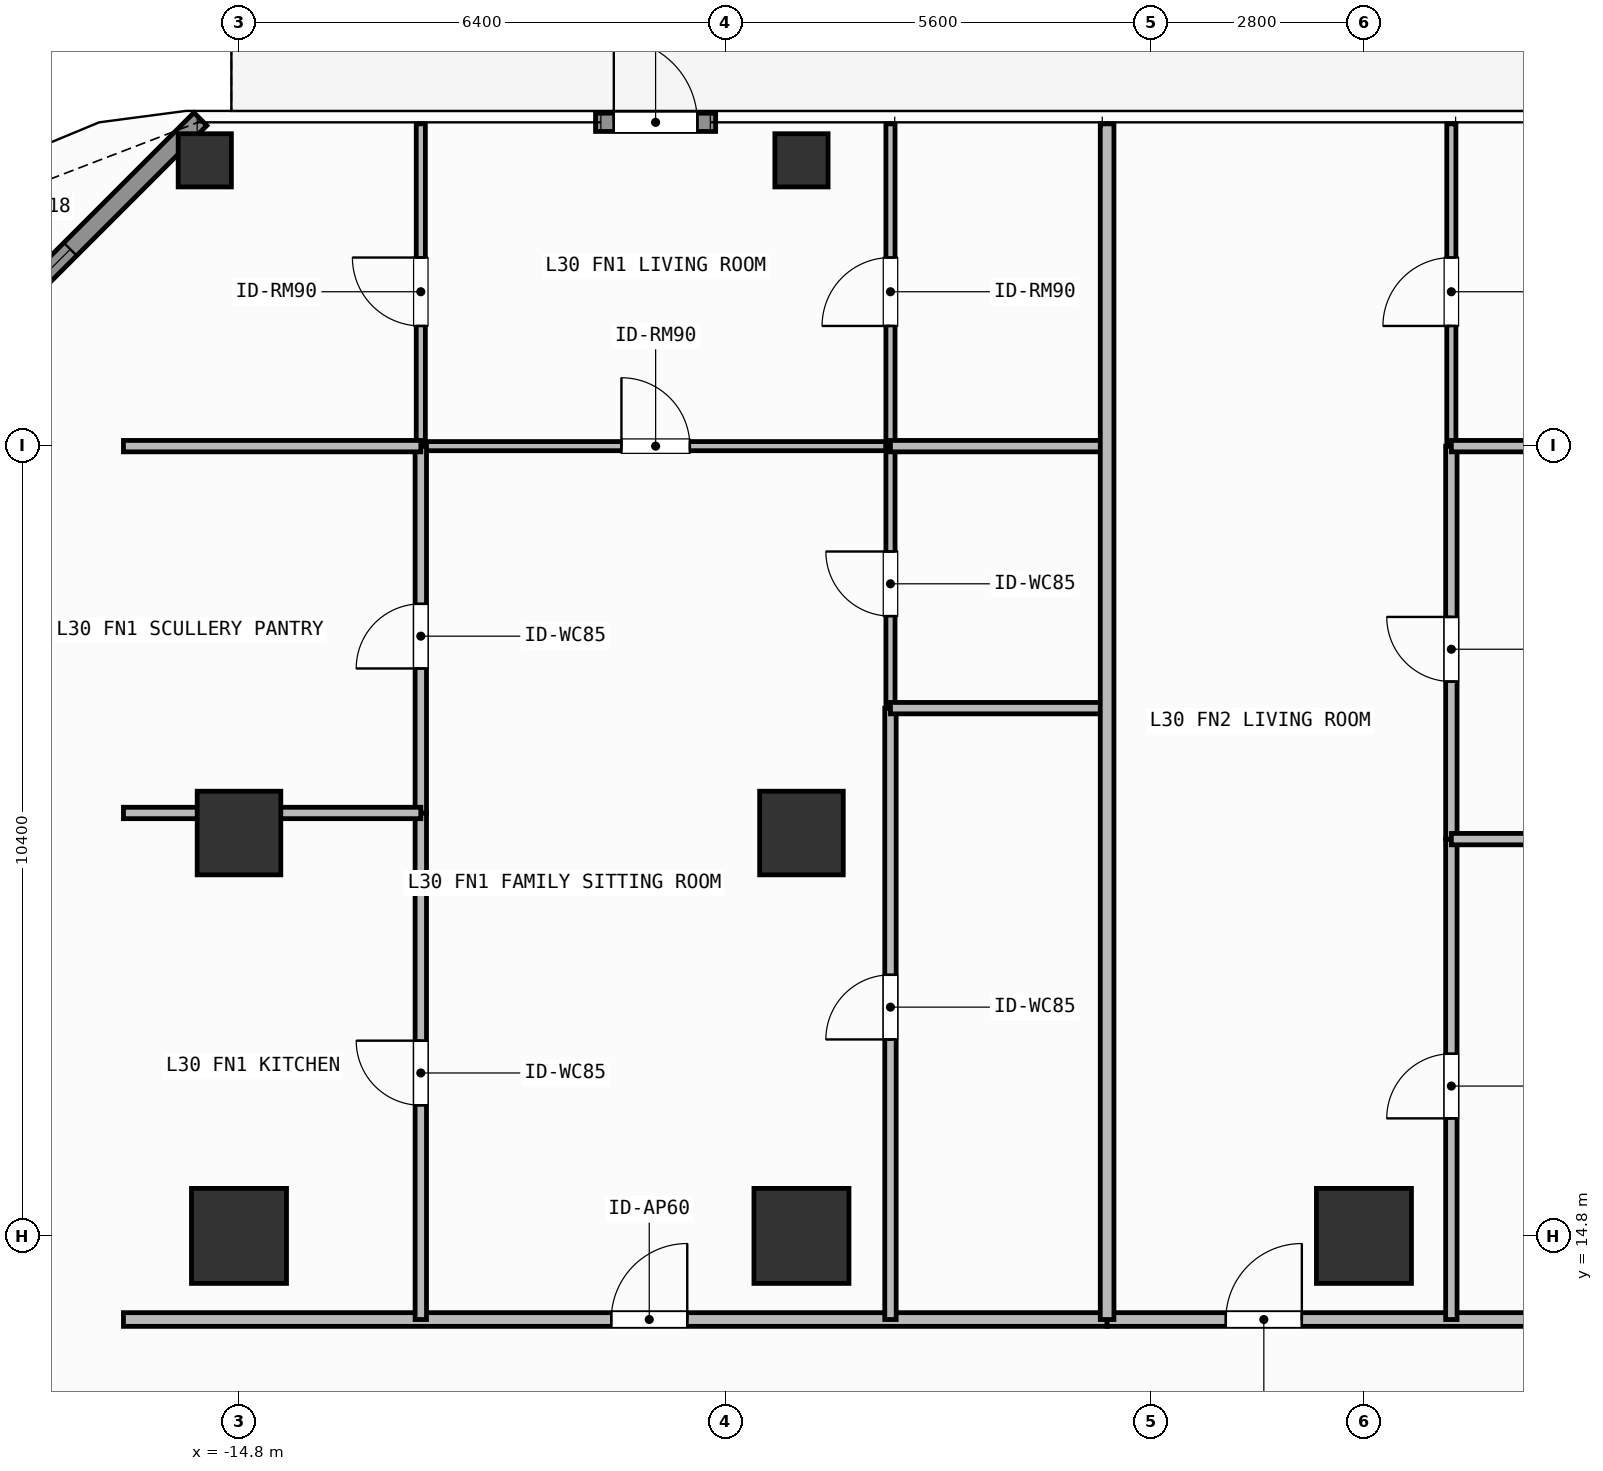
"""IFC4 building model, lengths in metres.
Left out: names, types, materials, properties, quantities, classifications, styles, units other than length and angle.
Written with IfcOpenShell. Run it as: python <this file> out.ifc"""

import sys

from ifc_helpers import new_model, si_unit, direction, frame, frame_2d, origin, origin_2d, place, context, subcontext, project, spatial, rectangle, hollow_rectangle, extrude, element, fill, save


model = new_model("IFC4")
c1 = context("Model", 3, precision=1e-05, world=origin(), true_north=direction((0.0, 1.0)))
c2 = subcontext(c1, "Body", "Model", "MODEL_VIEW")
j1 = project(units=[si_unit("LENGTHUNIT", "METRE"), si_unit("PLANEANGLEUNIT", "RADIAN")], contexts=[c1])
p1 = place(None, origin())
s1 = spatial("IfcSite", under=j1, at=p1, CompositionType="ELEMENT")
p2 = place(p1, origin())
s2 = spatial("IfcBuilding", under=s1, at=p2, CompositionType="ELEMENT")
p3 = place(p2, frame((0.0, 0.0, 121.2)))
s3 = spatial("IfcBuildingStorey", under=s2, at=p3, CompositionType="ELEMENT", Elevation=121.2)
for number, where, z_axis, x_axis in (
    (1, (-14.8, 14.8, 0.0), (0.0, 0.0, 1.0), (1.0, 0.0, 0.0)),
    (2, (-7.4, 14.8, 0.0), (0.0, 0.0, 1.0), (1.0, 0.0, 0.0)),
    (3, (0.0, 14.8, 0.0), (0.0, 0.0, 1.0), (1.0, 0.0, 0.0)),
):
    element("IfcColumn", number, at=place(p3, frame(where, z_axis=z_axis, x_axis=x_axis)), inside=s3, PredefinedType="COLUMN", context=c2, shape_type="SweptSolid", body=[
        extrude(rectangle(XDim=1.25, YDim=1.25, at=origin_2d()), origin(), (0.0, 0.0, 1.0), 3.9),
    ])
for number, where, z_axis, x_axis in (
    (4, (-14.8, 20.1, 0.0), (0.0, 0.0, 1.0), (1.0, 0.0, 0.0)),
    (5, (-7.4, 20.1, 0.0), (0.0, 0.0, 1.0), (1.0, 0.0, 0.0)),
):
    element("IfcColumn", number, at=place(p3, frame(where, z_axis=z_axis, x_axis=x_axis)), inside=s3, PredefinedType="COLUMN", context=c2, shape_type="SweptSolid", body=[
        extrude(rectangle(XDim=1.1, YDim=1.1, at=origin_2d()), origin(), (0.0, 0.0, 1.0), 3.9),
    ])
for number, where, z_axis, x_axis in (
    (6, (-15.25, 28.95, 0.0), (0.0, 0.0, 1.0), (1.0, 0.0, 0.0)),
    (7, (-7.4, 28.95, 0.0), (0.0, 0.0, 1.0), (1.0, 0.0, 0.0)),
):
    element("IfcColumn", number, at=place(p3, frame(where, z_axis=z_axis, x_axis=x_axis)), inside=s3, PredefinedType="COLUMN", context=c2, shape_type="SweptSolid", body=[
        extrude(hollow_rectangle(XDim=0.7, YDim=0.7, WallThickness=0.032, at=origin_2d()), origin(), (0.0, 0.0, 1.0), 3.9),
    ])
p4 = place(p3, frame((-10.109, 29.45, 0.0), z_axis=(0.0, 0.0, 1.0), x_axis=(1.0, 0.0, 0.0)))
e8 = element("IfcWall", 8, at=p4, inside=s3, PredefinedType="SOLIDWALL", context=c2, shape_type="SweptSolid", body=[
    extrude(rectangle(XDim=1.58, YDim=0.24, at=frame_2d((0.79, 0.0))), origin(), (0.0, 0.0, 1.0), 3.68),
])
p5 = place(p4, frame((0.24, 0.0, 0.0)))
e9 = element("IfcOpeningElement", 9, at=p5, cuts=e8, PredefinedType="OPENING", context=c2, shape_type="SweptSolid", body=[
    extrude(rectangle(XDim=1.1, YDim=2.2, at=frame_2d((0.55, 1.1))), frame((0.0, 0.13, 0.0), z_axis=(0.0, -1.0, 0.0), x_axis=(1.0, 0.0, 0.0)), (0.0, 0.0, 1.0), 0.26),
])
p6 = place(p3, frame((-19.792, 25.008, 0.0), z_axis=(0.0, 0.0, 1.0), x_axis=(0.707106781187, 0.707106781187, 0.0)))
e10 = element("IfcWall", 10, at=p6, inside=s3, PredefinedType="SOLIDWALL", context=c2, shape_type="SweptSolid", body=[
    extrude(rectangle(XDim=6.343, YDim=0.24, at=frame_2d((3.171, 0.0))), origin(), (0.0, 0.0, 1.0), 3.68),
])
p7 = place(p6, frame((2.421, 0.0, 0.8)))
e11 = element("IfcOpeningElement", 11, at=p7, cuts=e10, PredefinedType="OPENING", context=c2, shape_type="SweptSolid", body=[
    extrude(rectangle(XDim=1.5, YDim=1.85, at=frame_2d((0.75, 0.925))), frame((0.0, 0.13, 0.0), z_axis=(0.0, -1.0, 0.0), x_axis=(1.0, 0.0, 0.0)), (0.0, 0.0, 1.0), 0.26),
])
p8 = place(p3, frame((-16.32, 13.7, 0.0), z_axis=(0.0, 0.0, 1.0), x_axis=(1.0, 0.0, 0.0)))
e12 = element("IfcWall", 12, at=p8, inside=s3, PredefinedType="PARTITIONING", context=c2, shape_type="SweptSolid", body=[
    extrude(rectangle(XDim=12.941, YDim=0.18, at=frame_2d((6.471, 0.0))), origin(), (0.0, 0.0, 1.0), 3.68),
])
p9 = place(p8, frame((6.417, 0.0, 0.0)))
e13 = element("IfcOpeningElement", 13, at=p9, cuts=e12, PredefinedType="OPENING", context=c2, shape_type="SweptSolid", body=[
    extrude(rectangle(XDim=1.0, YDim=2.2, at=frame_2d((0.5, 1.1))), frame((0.0, 0.1, 0.0), z_axis=(0.0, -1.0, 0.0), x_axis=(1.0, 0.0, 0.0)), (0.0, 0.0, 1.0), 0.2),
])
p10 = place(p3, frame((-12.408, 25.19, 0.0), z_axis=(0.0, 0.0, 1.0), x_axis=(1.0, 0.0, 0.0)))
e14 = element("IfcWall", 14, at=p10, inside=s3, PredefinedType="PARTITIONING", context=c2, shape_type="SweptSolid", body=[
    extrude(rectangle(XDim=6.179, YDim=0.12, at=frame_2d((3.089, 0.0))), origin(), (0.0, 0.0, 1.0), 3.68),
])
p11 = place(p10, frame((2.639, 0.0, 0.0)))
e15 = element("IfcOpeningElement", 15, at=p11, cuts=e14, PredefinedType="OPENING", context=c2, shape_type="SweptSolid", body=[
    extrude(rectangle(XDim=0.9, YDim=2.1, at=frame_2d((0.45, 1.05))), frame((0.0, 0.07, 0.0), z_axis=(0.0, -1.0, 0.0), x_axis=(1.0, 0.0, 0.0)), (0.0, 0.0, 1.0), 0.14),
])
p12 = place(p3, frame((-12.408, 13.7, 0.0), z_axis=(0.0, 0.0, 1.0), x_axis=(0.0, 1.0, 0.0)))
e16 = element("IfcWall", 16, at=p12, inside=s3, PredefinedType="PARTITIONING", context=c2, shape_type="SweptSolid", body=[
    extrude(rectangle(XDim=6.664, YDim=0.15, at=frame_2d((3.332, 0.0))), origin(), (0.0, 0.0, 1.0), 3.68),
])
p13 = place(p12, frame((2.818, 0.0, 0.0)))
e17 = element("IfcOpeningElement", 17, at=p13, cuts=e16, PredefinedType="OPENING", context=c2, shape_type="SweptSolid", body=[
    extrude(rectangle(XDim=0.85, YDim=2.1, at=frame_2d((0.425, 1.05))), frame((0.0, 0.085, 0.0), z_axis=(0.0, -1.0, 0.0), x_axis=(1.0, 0.0, 0.0)), (0.0, 0.0, 1.0), 0.17),
])
p14 = place(p3, frame((-12.408, 20.364, 0.0), z_axis=(0.0, 0.0, 1.0), x_axis=(0.0, 1.0, 0.0)))
e18 = element("IfcWall", 18, at=p14, inside=s3, PredefinedType="PARTITIONING", context=c2, shape_type="SweptSolid", body=[
    extrude(rectangle(XDim=4.826, YDim=0.15, at=frame_2d((2.413, 0.0))), origin(), (0.0, 0.0, 1.0), 3.68),
])
p15 = place(p14, frame((1.901, 0.0, 0.0)))
e19 = element("IfcOpeningElement", 19, at=p15, cuts=e18, PredefinedType="OPENING", context=c2, shape_type="SweptSolid", body=[
    extrude(rectangle(XDim=0.85, YDim=2.1, at=frame_2d((0.425, 1.05))), frame((0.0, 0.085, 0.0), z_axis=(0.0, -1.0, 0.0), x_axis=(1.0, 0.0, 0.0)), (0.0, 0.0, 1.0), 0.17),
])
p16 = place(p3, frame((-12.408, 25.19, 0.0), z_axis=(0.0, 0.0, 1.0), x_axis=(0.0, 1.0, 0.0)))
e20 = element("IfcWall", 20, at=p16, inside=s3, PredefinedType="PARTITIONING", context=c2, shape_type="SweptSolid", body=[
    extrude(rectangle(XDim=4.24, YDim=0.12, at=frame_2d((2.12, 0.0))), origin(), (0.0, 0.0, 1.0), 3.68),
])
p17 = place(p16, frame((1.581, 0.0, 0.0)))
e21 = element("IfcOpeningElement", 21, at=p17, cuts=e20, PredefinedType="OPENING", context=c2, shape_type="SweptSolid", body=[
    extrude(rectangle(XDim=0.9, YDim=2.1, at=frame_2d((0.45, 1.05))), frame((0.0, 0.07, 0.0), z_axis=(0.0, -1.0, 0.0), x_axis=(1.0, 0.0, 0.0)), (0.0, 0.0, 1.0), 0.14),
])
p18 = place(p3, frame((-6.229, 13.7, 0.0), z_axis=(0.0, 0.0, 1.0), x_axis=(0.0, 1.0, 0.0)))
e22 = element("IfcWall", 22, at=p18, inside=s3, PredefinedType="PARTITIONING", context=c2, shape_type="SweptSolid", body=[
    extrude(rectangle(XDim=8.043, YDim=0.15, at=frame_2d((4.021, 0.0))), origin(), (0.0, 0.0, 1.0), 3.68),
])
p19 = place(p18, frame((3.685, 0.0, 0.0)))
e23 = element("IfcOpeningElement", 23, at=p19, cuts=e22, PredefinedType="OPENING", context=c2, shape_type="SweptSolid", body=[
    extrude(rectangle(XDim=0.85, YDim=2.1, at=frame_2d((0.425, 1.05))), frame((0.0, 0.085, 0.0), z_axis=(0.0, -1.0, 0.0), x_axis=(1.0, 0.0, 0.0)), (0.0, 0.0, 1.0), 0.17),
])
p20 = place(p3, frame((-6.229, 21.743, 0.0), z_axis=(0.0, 0.0, 1.0), x_axis=(0.0, 1.0, 0.0)))
e24 = element("IfcWall", 24, at=p20, inside=s3, PredefinedType="PARTITIONING", context=c2, shape_type="SweptSolid", body=[
    extrude(rectangle(XDim=3.447, YDim=0.12, at=frame_2d((1.724, 0.0))), origin(), (0.0, 0.0, 1.0), 3.68),
])
p21 = place(p20, frame((1.211, 0.0, 0.0)))
e25 = element("IfcOpeningElement", 25, at=p21, cuts=e24, PredefinedType="OPENING", context=c2, shape_type="SweptSolid", body=[
    extrude(rectangle(XDim=0.85, YDim=2.1, at=frame_2d((0.425, 1.05))), frame((0.0, 0.07, 0.0), z_axis=(0.0, -1.0, 0.0), x_axis=(1.0, 0.0, 0.0)), (0.0, 0.0, 1.0), 0.14),
])
p22 = place(p3, frame((-6.229, 25.19, 0.0), z_axis=(0.0, 0.0, 1.0), x_axis=(0.0, 1.0, 0.0)))
e26 = element("IfcWall", 26, at=p22, inside=s3, PredefinedType="PARTITIONING", context=c2, shape_type="SweptSolid", body=[
    extrude(rectangle(XDim=4.24, YDim=0.12, at=frame_2d((2.12, 0.0))), origin(), (0.0, 0.0, 1.0), 3.68),
])
p23 = place(p22, frame((1.581, 0.0, 0.0)))
e27 = element("IfcOpeningElement", 27, at=p23, cuts=e26, PredefinedType="OPENING", context=c2, shape_type="SweptSolid", body=[
    extrude(rectangle(XDim=0.9, YDim=2.1, at=frame_2d((0.45, 1.05))), frame((0.0, 0.07, 0.0), z_axis=(0.0, -1.0, 0.0), x_axis=(1.0, 0.0, 0.0)), (0.0, 0.0, 1.0), 0.14),
])
p24 = place(p3, frame((-3.379, 13.7, 0.0), z_axis=(0.0, 0.0, 1.0), x_axis=(1.0, 0.0, 0.0)))
e28 = element("IfcWall", 28, at=p24, inside=s3, PredefinedType="PARTITIONING", context=c2, shape_type="SweptSolid", body=[
    extrude(rectangle(XDim=7.279, YDim=0.18, at=frame_2d((3.639, 0.0))), origin(), (0.0, 0.0, 1.0), 3.68),
])
p25 = place(p24, frame((1.562, 0.0, 0.0)))
e29 = element("IfcOpeningElement", 29, at=p25, cuts=e28, PredefinedType="OPENING", context=c2, shape_type="SweptSolid", body=[
    extrude(rectangle(XDim=1.0, YDim=2.2, at=frame_2d((0.5, 1.1))), frame((0.0, 0.1, 0.0), z_axis=(0.0, -1.0, 0.0), x_axis=(1.0, 0.0, 0.0)), (0.0, 0.0, 1.0), 0.2),
])
p26 = place(p3, frame((1.15, 13.7, 0.0), z_axis=(0.0, 0.0, 1.0), x_axis=(0.0, 1.0, 0.0)))
e30 = element("IfcWall", 30, at=p26, inside=s3, PredefinedType="PARTITIONING", context=c2, shape_type="SweptSolid", body=[
    extrude(rectangle(XDim=6.32, YDim=0.15, at=frame_2d((3.16, 0.0))), origin(), (0.0, 0.0, 1.0), 3.68),
])
p27 = place(p26, frame((2.646, 0.0, 0.0)))
e31 = element("IfcOpeningElement", 31, at=p27, cuts=e30, PredefinedType="OPENING", context=c2, shape_type="SweptSolid", body=[
    extrude(rectangle(XDim=0.85, YDim=2.1, at=frame_2d((0.425, 1.05))), frame((0.0, 0.085, 0.0), z_axis=(0.0, -1.0, 0.0), x_axis=(1.0, 0.0, 0.0)), (0.0, 0.0, 1.0), 0.17),
])
p28 = place(p3, frame((1.15, 20.02, 0.0), z_axis=(0.0, 0.0, 1.0), x_axis=(0.0, 1.0, 0.0)))
e32 = element("IfcWall", 32, at=p28, inside=s3, PredefinedType="PARTITIONING", context=c2, shape_type="SweptSolid", body=[
    extrude(rectangle(XDim=5.17, YDim=0.15, at=frame_2d((2.585, 0.0))), origin(), (0.0, 0.0, 1.0), 3.68),
])
p29 = place(p28, frame((2.073, 0.0, 0.0)))
e33 = element("IfcOpeningElement", 33, at=p29, cuts=e32, PredefinedType="OPENING", context=c2, shape_type="SweptSolid", body=[
    extrude(rectangle(XDim=0.85, YDim=2.1, at=frame_2d((0.425, 1.05))), frame((0.0, 0.085, 0.0), z_axis=(0.0, -1.0, 0.0), x_axis=(1.0, 0.0, 0.0)), (0.0, 0.0, 1.0), 0.17),
])
p30 = place(p3, frame((1.15, 25.19, 0.0), z_axis=(0.0, 0.0, 1.0), x_axis=(0.0, 1.0, 0.0)))
e34 = element("IfcWall", 34, at=p30, inside=s3, PredefinedType="PARTITIONING", context=c2, shape_type="SweptSolid", body=[
    extrude(rectangle(XDim=4.24, YDim=0.12, at=frame_2d((2.12, 0.0))), origin(), (0.0, 0.0, 1.0), 3.68),
])
p31 = place(p30, frame((1.581, 0.0, 0.0)))
e35 = element("IfcOpeningElement", 35, at=p31, cuts=e34, PredefinedType="OPENING", context=c2, shape_type="SweptSolid", body=[
    extrude(rectangle(XDim=0.9, YDim=2.1, at=frame_2d((0.45, 1.05))), frame((0.0, 0.07, 0.0), z_axis=(0.0, -1.0, 0.0), x_axis=(1.0, 0.0, 0.0)), (0.0, 0.0, 1.0), 0.14),
])
p32 = place(p3, frame((-16.32, 20.364, 0.0), z_axis=(0.0, 0.0, 1.0), x_axis=(1.0, 0.0, 0.0)))
e36 = element("IfcWall", 36, at=p32, inside=s3, PredefinedType="PARTITIONING", context=c2, shape_type="SweptSolid", body=[
    extrude(rectangle(XDim=3.912, YDim=0.15, at=frame_2d((1.956, 0.0))), origin(), (0.0, 0.0, 1.0), 3.082),
])
p33 = place(p3, frame((-16.32, 25.19, 0.0), z_axis=(0.0, 0.0, 1.0), x_axis=(1.0, 0.0, 0.0)))
e37 = element("IfcWall", 37, at=p33, inside=s3, PredefinedType="PARTITIONING", context=c2, shape_type="SweptSolid", body=[
    extrude(rectangle(XDim=3.912, YDim=0.15, at=frame_2d((1.956, 0.0))), origin(), (0.0, 0.0, 1.0), 3.68),
])
for number, where, z_axis, x_axis in (
    (38, (-6.229, 21.743, 0.0), (0.0, 0.0, 1.0), (1.0, 0.0, 0.0)),
    (39, (-6.229, 25.19, 0.0), (0.0, 0.0, 1.0), (1.0, 0.0, 0.0)),
):
    element("IfcWall", number, at=place(p3, frame(where, z_axis=z_axis, x_axis=x_axis)), inside=s3, PredefinedType="PARTITIONING", context=c2, shape_type="SweptSolid", body=[
        extrude(rectangle(XDim=2.85, YDim=0.15, at=frame_2d((1.425, 0.0))), origin(), (0.0, 0.0, 1.0), 3.68),
    ])
p34 = place(p3, frame((1.15, 20.02, 0.0), z_axis=(0.0, 0.0, 1.0), x_axis=(1.0, 0.0, 0.0)))
e40 = element("IfcWall", 40, at=p34, inside=s3, PredefinedType="PARTITIONING", context=c2, shape_type="SweptSolid", body=[
    extrude(rectangle(XDim=2.75, YDim=0.15, at=frame_2d((1.375, 0.0))), origin(), (0.0, 0.0, 1.0), 3.082),
])
p35 = place(p3, frame((1.15, 25.19, 0.0), z_axis=(0.0, 0.0, 1.0), x_axis=(1.0, 0.0, 0.0)))
e41 = element("IfcWall", 41, at=p35, inside=s3, PredefinedType="PARTITIONING", context=c2, shape_type="SweptSolid", body=[
    extrude(rectangle(XDim=2.75, YDim=0.15, at=frame_2d((1.375, 0.0))), origin(), (0.0, 0.0, 1.0), 3.68),
])
p36 = place(p3, frame((-3.379, 13.7, 0.0), z_axis=(0.0, 0.0, 1.0), x_axis=(0.0, 1.0, 0.0)))
e42 = element("IfcWall", 42, at=p36, inside=s3, PredefinedType="PARTITIONING", context=c2, shape_type="SweptSolid", body=[
    extrude(rectangle(XDim=15.73, YDim=0.18, at=frame_2d((7.865, 0.0))), origin(), (0.0, 0.0, 1.0), 3.68),
])
p37 = place(p5, origin())
e43 = element("IfcDoor", 43, at=p37, inside=s3, OperationType="SINGLE_SWING_LEFT", PredefinedType="DOOR", context=c2, shape_type="SweptSolid", body=[
    extrude(rectangle(XDim=1.1, YDim=2.2, at=frame_2d((0.55, 1.1))), frame((0.0, 0.025, 0.0), z_axis=(0.0, -1.0, 0.0), x_axis=(1.0, 0.0, 0.0)), (0.0, 0.0, 1.0), 0.05),
])
fill(e9, e43)
p38 = place(p7, origin())
e44 = element("IfcWindow", 44, at=p38, inside=s3, PartitioningType="SINGLE_PANEL", PredefinedType="WINDOW", context=c2, shape_type="SweptSolid", body=[
    extrude(rectangle(XDim=1.5, YDim=1.85, at=frame_2d((0.75, 0.925))), frame((0.0, 0.03, 0.0), z_axis=(0.0, -1.0, 0.0), x_axis=(1.0, 0.0, 0.0)), (0.0, 0.0, 1.0), 0.06),
])
fill(e11, e44)
p39 = place(p9, origin())
e45 = element("IfcDoor", 45, at=p39, inside=s3, OperationType="SINGLE_SWING_RIGHT", PredefinedType="DOOR", context=c2, shape_type="SweptSolid", body=[
    extrude(rectangle(XDim=1.0, YDim=2.2, at=frame_2d((0.5, 1.1))), frame((0.0, 0.025, 0.0), z_axis=(0.0, -1.0, 0.0), x_axis=(1.0, 0.0, 0.0)), (0.0, 0.0, 1.0), 0.05),
])
fill(e13, e45)
p40 = place(p11, origin())
e46 = element("IfcDoor", 46, at=p40, inside=s3, OperationType="SINGLE_SWING_LEFT", PredefinedType="DOOR", context=c2, shape_type="SweptSolid", body=[
    extrude(rectangle(XDim=0.9, YDim=2.1, at=frame_2d((0.45, 1.05))), frame((0.0, 0.025, 0.0), z_axis=(0.0, -1.0, 0.0), x_axis=(1.0, 0.0, 0.0)), (0.0, 0.0, 1.0), 0.05),
])
fill(e15, e46)
p41 = place(p13, origin())
e47 = element("IfcDoor", 47, at=p41, inside=s3, OperationType="SINGLE_SWING_RIGHT", PredefinedType="DOOR", context=c2, shape_type="SweptSolid", body=[
    extrude(rectangle(XDim=0.85, YDim=2.1, at=frame_2d((0.425, 1.05))), frame((0.0, 0.025, 0.0), z_axis=(0.0, -1.0, 0.0), x_axis=(1.0, 0.0, 0.0)), (0.0, 0.0, 1.0), 0.05),
])
fill(e17, e47)
p42 = place(p15, origin())
e48 = element("IfcDoor", 48, at=p42, inside=s3, OperationType="SINGLE_SWING_LEFT", PredefinedType="DOOR", context=c2, shape_type="SweptSolid", body=[
    extrude(rectangle(XDim=0.85, YDim=2.1, at=frame_2d((0.425, 1.05))), frame((0.0, 0.025, 0.0), z_axis=(0.0, -1.0, 0.0), x_axis=(1.0, 0.0, 0.0)), (0.0, 0.0, 1.0), 0.05),
])
fill(e19, e48)
p43 = place(p17, origin())
e49 = element("IfcDoor", 49, at=p43, inside=s3, OperationType="SINGLE_SWING_RIGHT", PredefinedType="DOOR", context=c2, shape_type="SweptSolid", body=[
    extrude(rectangle(XDim=0.9, YDim=2.1, at=frame_2d((0.45, 1.05))), frame((0.0, 0.025, 0.0), z_axis=(0.0, -1.0, 0.0), x_axis=(1.0, 0.0, 0.0)), (0.0, 0.0, 1.0), 0.05),
])
fill(e21, e49)
p44 = place(p19, origin())
e50 = element("IfcDoor", 50, at=p44, inside=s3, OperationType="SINGLE_SWING_LEFT", PredefinedType="DOOR", context=c2, shape_type="SweptSolid", body=[
    extrude(rectangle(XDim=0.85, YDim=2.1, at=frame_2d((0.425, 1.05))), frame((0.0, 0.025, 0.0), z_axis=(0.0, -1.0, 0.0), x_axis=(1.0, 0.0, 0.0)), (0.0, 0.0, 1.0), 0.05),
])
fill(e23, e50)
p45 = place(p21, origin())
e51 = element("IfcDoor", 51, at=p45, inside=s3, OperationType="SINGLE_SWING_RIGHT", PredefinedType="DOOR", context=c2, shape_type="SweptSolid", body=[
    extrude(rectangle(XDim=0.85, YDim=2.1, at=frame_2d((0.425, 1.05))), frame((0.0, 0.025, 0.0), z_axis=(0.0, -1.0, 0.0), x_axis=(1.0, 0.0, 0.0)), (0.0, 0.0, 1.0), 0.05),
])
fill(e25, e51)
p46 = place(p23, origin())
e52 = element("IfcDoor", 52, at=p46, inside=s3, OperationType="SINGLE_SWING_LEFT", PredefinedType="DOOR", context=c2, shape_type="SweptSolid", body=[
    extrude(rectangle(XDim=0.9, YDim=2.1, at=frame_2d((0.45, 1.05))), frame((0.0, 0.025, 0.0), z_axis=(0.0, -1.0, 0.0), x_axis=(1.0, 0.0, 0.0)), (0.0, 0.0, 1.0), 0.05),
])
fill(e27, e52)
p47 = place(p25, origin())
e53 = element("IfcDoor", 53, at=p47, inside=s3, OperationType="SINGLE_SWING_RIGHT", PredefinedType="DOOR", context=c2, shape_type="SweptSolid", body=[
    extrude(rectangle(XDim=1.0, YDim=2.2, at=frame_2d((0.5, 1.1))), frame((0.0, 0.025, 0.0), z_axis=(0.0, -1.0, 0.0), x_axis=(1.0, 0.0, 0.0)), (0.0, 0.0, 1.0), 0.05),
])
fill(e29, e53)
p48 = place(p27, origin())
e54 = element("IfcDoor", 54, at=p48, inside=s3, OperationType="SINGLE_SWING_LEFT", PredefinedType="DOOR", context=c2, shape_type="SweptSolid", body=[
    extrude(rectangle(XDim=0.85, YDim=2.1, at=frame_2d((0.425, 1.05))), frame((0.0, 0.025, 0.0), z_axis=(0.0, -1.0, 0.0), x_axis=(1.0, 0.0, 0.0)), (0.0, 0.0, 1.0), 0.05),
])
fill(e31, e54)
p49 = place(p29, origin())
e55 = element("IfcDoor", 55, at=p49, inside=s3, OperationType="SINGLE_SWING_RIGHT", PredefinedType="DOOR", context=c2, shape_type="SweptSolid", body=[
    extrude(rectangle(XDim=0.85, YDim=2.1, at=frame_2d((0.425, 1.05))), frame((0.0, 0.025, 0.0), z_axis=(0.0, -1.0, 0.0), x_axis=(1.0, 0.0, 0.0)), (0.0, 0.0, 1.0), 0.05),
])
fill(e33, e55)
p50 = place(p31, origin())
e56 = element("IfcDoor", 56, at=p50, inside=s3, OperationType="SINGLE_SWING_LEFT", PredefinedType="DOOR", context=c2, shape_type="SweptSolid", body=[
    extrude(rectangle(XDim=0.9, YDim=2.1, at=frame_2d((0.45, 1.05))), frame((0.0, 0.025, 0.0), z_axis=(0.0, -1.0, 0.0), x_axis=(1.0, 0.0, 0.0)), (0.0, 0.0, 1.0), 0.05),
])
fill(e35, e56)
save(model, sys.argv[1])
